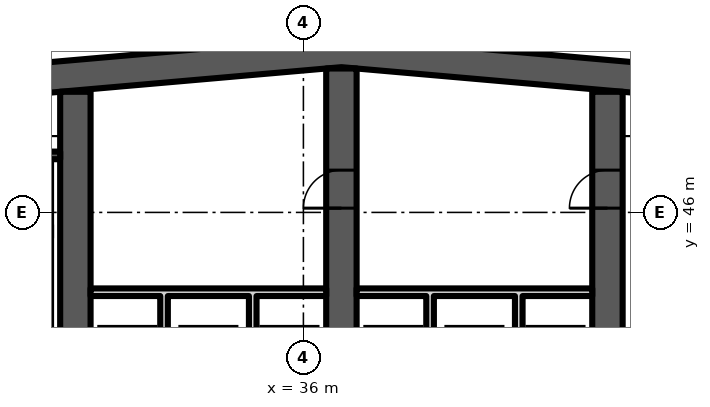
"""IFC4 building model, lengths in metres.
Left out: names, types, materials, properties, quantities, classifications, styles, units other than length and angle.
Written with IfcOpenShell. Run it as: python <this file> out.ifc"""

import sys

from ifc_helpers import new_model, si_unit, direction, frame, frame_2d, origin, place, context, subcontext, project, spatial, polyline, rectangle, outline, extrude, element, fill, save


model = new_model("IFC4")
c1 = context("Model", 3, precision=1e-05, world=origin(), true_north=direction((0.0, 1.0)))
c2 = subcontext(c1, "Body", "Model", "MODEL_VIEW")
j1 = project(units=[si_unit("LENGTHUNIT", "METRE"), si_unit("PLANEANGLEUNIT", "RADIAN")], contexts=[c1])
p1 = place(None, origin())
s1 = spatial("IfcSite", under=j1, at=p1, CompositionType="ELEMENT")
p2 = place(p1, origin())
s2 = spatial("IfcBuilding", under=s1, at=p2, CompositionType="ELEMENT")
p3 = place(p2, frame((0.0, 0.0, 202.3)))
s3 = spatial("IfcBuildingStorey", under=s2, at=p3, CompositionType="ELEMENT", Elevation=202.3)
p4 = place(p3, origin())
e1 = element("IfcWall", 1, at=p4, inside=s3, PredefinedType="SHEAR", context=c2, shape_type="SweptSolid", body=[
    extrude(outline(polyline([(16.0, 47.984), (37.0, 49.822), (58.0, 47.984), (58.0, 48.787), (37.0, 50.625), (16.0, 48.787), (16.0, 47.984)])), origin(), (0.0, 0.0, 1.0), 4.8),
])
p5 = place(p3, frame((30.0, 34.8, 0.0), z_axis=(0.0, 0.0, 1.0), x_axis=(0.0, 1.0, 0.0)))
e2 = element("IfcWall", 2, at=p5, inside=s3, PredefinedType="SHEAR", context=c2, shape_type="SweptSolid", body=[
    extrude(rectangle(XDim=14.374, YDim=0.8, at=frame_2d((7.187, 0.0))), origin(), (0.0, 0.0, 1.0), 4.8),
])
p6 = place(p5, frame((3.6, 0.0, 0.0)))
e3 = element("IfcOpeningElement", 3, at=p6, cuts=e2, PredefinedType="OPENING", context=c2, shape_type="SweptSolid", body=[
    extrude(rectangle(XDim=1.1, YDim=2.1, at=frame_2d((0.55, 1.05))), frame((0.0, 0.41, 0.0), z_axis=(0.0, -1.0, 0.0), x_axis=(1.0, 0.0, 0.0)), (0.0, 0.0, 1.0), 0.82),
])
p7 = place(p3, frame((37.0, 34.8, 0.0), z_axis=(0.0, 0.0, 1.0), x_axis=(0.0, 1.0, 0.0)))
e4 = element("IfcWall", 4, at=p7, inside=s3, PredefinedType="SHEAR", context=c2, shape_type="SweptSolid", body=[
    extrude(rectangle(XDim=14.987, YDim=0.8, at=frame_2d((7.493, 0.0))), origin(), (0.0, 0.0, 1.0), 4.8),
])
p8 = place(p7, frame((11.312, 0.0, 0.0)))
e5 = element("IfcOpeningElement", 5, at=p8, cuts=e4, PredefinedType="OPENING", context=c2, shape_type="SweptSolid", body=[
    extrude(rectangle(XDim=1.0, YDim=2.1, at=frame_2d((0.5, 1.05))), frame((0.0, 0.41, 0.0), z_axis=(0.0, -1.0, 0.0), x_axis=(1.0, 0.0, 0.0)), (0.0, 0.0, 1.0), 0.82),
])
p9 = place(p7, frame((3.6, 0.0, 0.0)))
e6 = element("IfcOpeningElement", 6, at=p9, cuts=e4, PredefinedType="OPENING", context=c2, shape_type="SweptSolid", body=[
    extrude(rectangle(XDim=1.1, YDim=2.1, at=frame_2d((0.55, 1.05))), frame((0.0, 0.41, 0.0), z_axis=(0.0, -1.0, 0.0), x_axis=(1.0, 0.0, 0.0)), (0.0, 0.0, 1.0), 0.82),
])
p10 = place(p3, frame((44.0, 34.8, 0.0), z_axis=(0.0, 0.0, 1.0), x_axis=(0.0, 1.0, 0.0)))
e7 = element("IfcWall", 7, at=p10, inside=s3, PredefinedType="SHEAR", context=c2, shape_type="SweptSolid", body=[
    extrude(rectangle(XDim=14.374, YDim=0.8, at=frame_2d((7.187, 0.0))), origin(), (0.0, 0.0, 1.0), 4.8),
])
p11 = place(p10, frame((11.312, 0.0, 0.0)))
e8 = element("IfcOpeningElement", 8, at=p11, cuts=e7, PredefinedType="OPENING", context=c2, shape_type="SweptSolid", body=[
    extrude(rectangle(XDim=1.0, YDim=2.1, at=frame_2d((0.5, 1.05))), frame((0.0, 0.41, 0.0), z_axis=(0.0, -1.0, 0.0), x_axis=(1.0, 0.0, 0.0)), (0.0, 0.0, 1.0), 0.82),
])
p12 = place(p10, frame((3.6, 0.0, 0.0)))
e9 = element("IfcOpeningElement", 9, at=p12, cuts=e7, PredefinedType="OPENING", context=c2, shape_type="SweptSolid", body=[
    extrude(rectangle(XDim=1.1, YDim=2.1, at=frame_2d((0.55, 1.05))), frame((0.0, 0.41, 0.0), z_axis=(0.0, -1.0, 0.0), x_axis=(1.0, 0.0, 0.0)), (0.0, 0.0, 1.0), 0.82),
])
p13 = place(p3, frame((25.75, 47.5, 0.0), z_axis=(0.0, 0.0, 1.0), x_axis=(1.0, 0.0, 0.0)))
e10 = element("IfcWall", 10, at=p13, inside=s3, PredefinedType="SHEAR", context=c2, shape_type="SweptSolid", body=[
    extrude(rectangle(XDim=3.85, YDim=0.2, at=frame_2d((1.925, 0.0))), origin(), (0.0, 0.0, 1.0), 4.4),
])
p14 = place(p3, frame((0.0, 0.0, -0.0)))
e11 = element("IfcWall", 11, at=p14, inside=s3, PredefinedType="PARTITIONING", context=c2, shape_type="SweptSolid", body=[
    extrude(outline(polyline([(32.433, 40.8), (32.233, 40.8), (32.233, 43.8), (30.4, 43.8), (30.4, 44.0), (36.6, 44.0), (36.6, 43.8), (34.767, 43.8), (34.767, 40.8), (34.567, 40.8), (34.567, 43.8), (32.433, 43.8), (32.433, 40.8)])), origin(), (0.0, 0.0, 1.0), 4.4),
])
p15 = place(p3, frame((0.0, 0.0, -0.0)))
e12 = element("IfcWall", 12, at=p15, inside=s3, PredefinedType="PARTITIONING", context=c2, shape_type="SweptSolid", body=[
    extrude(outline(polyline([(39.433, 40.8), (39.233, 40.8), (39.233, 43.8), (37.4, 43.8), (37.4, 44.0), (43.6, 44.0), (43.6, 43.8), (41.767, 43.8), (41.767, 40.8), (41.567, 40.8), (41.567, 43.8), (39.433, 43.8), (39.433, 40.8)])), origin(), (0.0, 0.0, 1.0), 4.4),
])
p16 = place(p8, origin())
e13 = element("IfcDoor", 13, at=p16, inside=s3, OperationType="SINGLE_SWING_LEFT", PredefinedType="DOOR", context=c2, shape_type="SweptSolid", body=[
    extrude(rectangle(XDim=1.0, YDim=2.1, at=frame_2d((0.5, 1.05))), frame((0.0, 0.4, 0.0), z_axis=(0.0, -1.0, 0.0), x_axis=(1.0, 0.0, 0.0)), (0.0, 0.0, 1.0), 0.8),
])
fill(e5, e13)
p17 = place(p11, origin())
e14 = element("IfcDoor", 14, at=p17, inside=s3, OperationType="SINGLE_SWING_LEFT", PredefinedType="DOOR", context=c2, shape_type="SweptSolid", body=[
    extrude(rectangle(XDim=1.0, YDim=2.1, at=frame_2d((0.5, 1.05))), frame((0.0, 0.4, 0.0), z_axis=(0.0, -1.0, 0.0), x_axis=(1.0, 0.0, 0.0)), (0.0, 0.0, 1.0), 0.8),
])
fill(e8, e14)
save(model, sys.argv[1])
